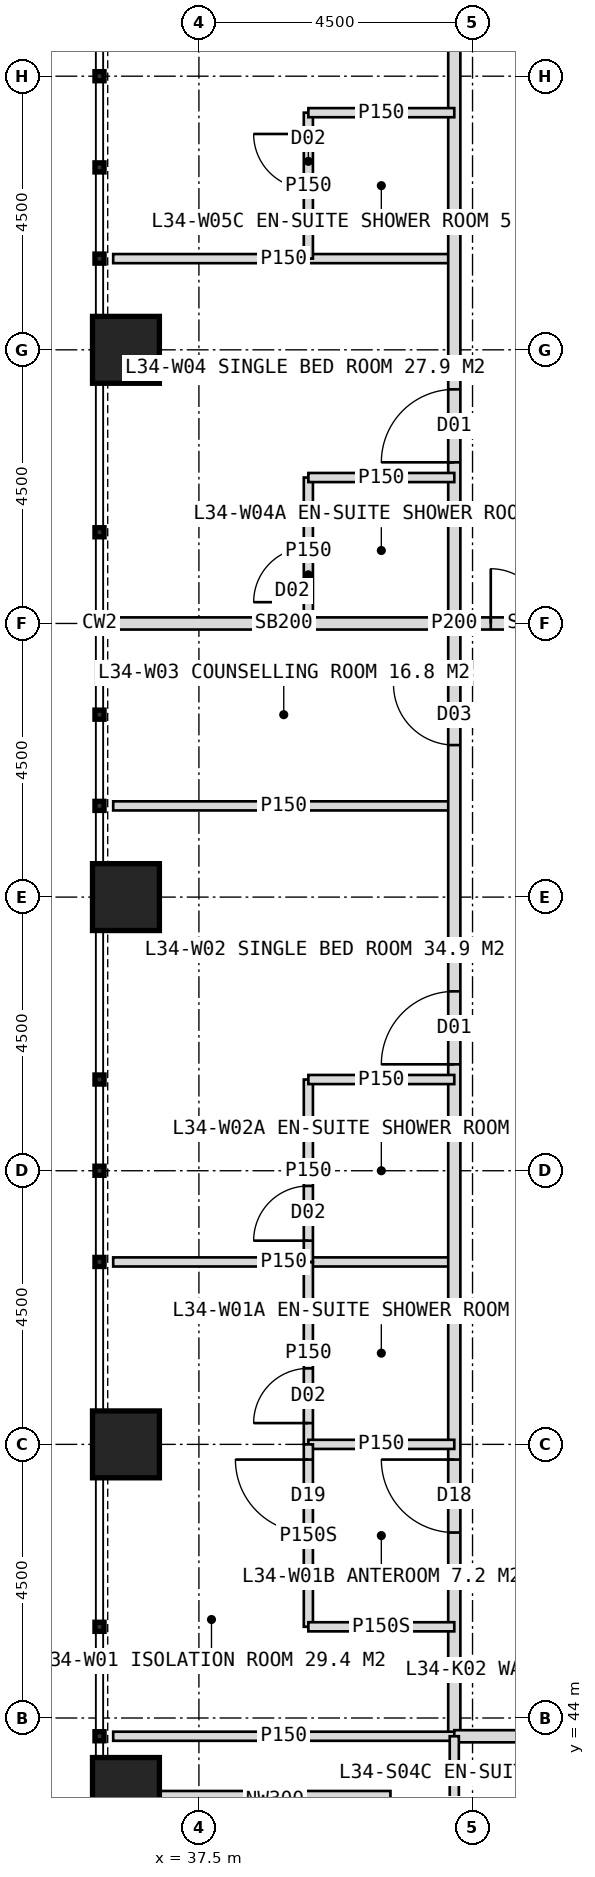
"""IFC4 building model, lengths in metres.
Left out: names, types, materials, properties, quantities, classifications, styles, units other than length and angle.
Written with IfcOpenShell. Run it as: python <this file> out.ifc"""

import sys

from ifc_helpers import new_model, si_unit, direction, frame, frame_2d, origin, origin_2d, place, context, subcontext, project, spatial, rectangle, hollow_rectangle, extrude, element, fill, save


model = new_model("IFC4")
c1 = context("Model", 3, precision=1e-05, world=origin(), true_north=direction((0.0, 1.0)))
c2 = subcontext(c1, "Body", "Model", "MODEL_VIEW")
j1 = project(units=[si_unit("LENGTHUNIT", "METRE"), si_unit("PLANEANGLEUNIT", "RADIAN")], contexts=[c1])
p1 = place(None, origin())
s1 = spatial("IfcSite", under=j1, at=p1, CompositionType="ELEMENT")
p2 = place(p1, origin())
s2 = spatial("IfcBuilding", under=s1, at=p2, CompositionType="ELEMENT")
p3 = place(p2, frame((0.0, 0.0, 144.0)))
s3 = spatial("IfcBuildingStorey", under=s2, at=p3, CompositionType="ELEMENT", Elevation=144.0)
for number, where, z_axis, x_axis in (
    (1, (36.3, 42.8, 0.0), (0.0, 0.0, 1.0), (1.0, 0.0, 0.0)),
    (2, (36.3, 48.5, 0.0), (0.0, 0.0, 1.0), (1.0, 0.0, 0.0)),
    (3, (36.3, 57.5, 0.0), (0.0, 0.0, 1.0), (1.0, 0.0, 0.0)),
    (4, (36.3, 66.5, 0.0), (0.0, 0.0, 1.0), (1.0, 0.0, 0.0)),
):
    element("IfcColumn", number, at=place(p3, frame(where, z_axis=z_axis, x_axis=x_axis)), inside=s3, PredefinedType="COLUMN", context=c2, shape_type="SweptSolid", body=[
        extrude(hollow_rectangle(XDim=1.1, YDim=1.1, WallThickness=0.1, at=origin_2d()), origin(), (0.0, 0.0, 1.0), 4.0),
    ])
p4 = place(p3, frame((40.65, 42.65, 0.0), z_axis=(0.0, 0.0, 1.0), x_axis=(-1.0, 0.0, 0.0)))
e5 = element("IfcWall", 5, at=p4, inside=s3, PredefinedType="ELEMENTEDWALL", context=c2, shape_type="SweptSolid", body=[
    extrude(rectangle(XDim=3.8, YDim=0.3, at=frame_2d((1.9, 0.0))), origin(), (0.0, 0.0, 1.0), 4.0),
])
for number, where, z_axis, x_axis in (
    (6, (41.7, 51.5, 0.0), (0.0, 0.0, 1.0), (-1.0, 0.0, 0.0)),
    (7, (41.7, 59.0, 0.0), (0.0, 0.0, 1.0), (-1.0, 0.0, 0.0)),
):
    element("IfcWall", number, at=place(p3, frame(where, z_axis=z_axis, x_axis=x_axis)), inside=s3, PredefinedType="PARTITIONING", context=c2, shape_type="SweptSolid", body=[
        extrude(rectangle(XDim=5.61, YDim=0.15, at=frame_2d((2.805, 0.0))), origin(), (0.0, 0.0, 1.0), 3.75),
    ])
p5 = place(p3, frame((41.7, 62.0, 0.0), z_axis=(0.0, 0.0, 1.0), x_axis=(-1.0, 0.0, 0.0)))
e8 = element("IfcWall", 8, at=p5, inside=s3, PredefinedType="SOLIDWALL", context=c2, shape_type="SweptSolid", body=[
    extrude(rectangle(XDim=5.61, YDim=0.2, at=frame_2d((2.805, 0.0))), origin(), (0.0, 0.0, 1.0), 2.95),
])
p6 = place(p3, frame((41.7, 68.0, 0.0), z_axis=(0.0, 0.0, 1.0), x_axis=(-1.0, 0.0, 0.0)))
e9 = element("IfcWall", 9, at=p6, inside=s3, PredefinedType="PARTITIONING", context=c2, shape_type="SweptSolid", body=[
    extrude(rectangle(XDim=5.61, YDim=0.15, at=frame_2d((2.805, 0.0))), origin(), (0.0, 0.0, 1.0), 3.75),
])
p7 = place(p3, frame((41.7, 43.7, 0.0), z_axis=(0.0, 0.0, 1.0), x_axis=(0.0, 1.0, 0.0)))
e10 = element("IfcWall", 10, at=p7, inside=s3, PredefinedType="PARTITIONING", context=c2, shape_type="SweptSolid", body=[
    extrude(rectangle(XDim=36.6, YDim=0.2, at=frame_2d((18.3, 0.0))), origin(), (0.0, 0.0, 1.0), 3.75),
])
p8 = place(p7, frame((3.35, 0.0, 0.0)))
e11 = element("IfcOpeningElement", 11, at=p8, cuts=e10, PredefinedType="OPENING", context=c2, shape_type="SweptSolid", body=[
    extrude(rectangle(XDim=1.2, YDim=2.2, at=frame_2d((0.6, 1.1))), frame((0.0, 0.11, 0.0), z_axis=(0.0, -1.0, 0.0), x_axis=(1.0, 0.0, 0.0)), (0.0, 0.0, 1.0), 0.22),
])
p9 = place(p7, frame((11.05, 0.0, 0.0)))
e12 = element("IfcOpeningElement", 12, at=p9, cuts=e10, PredefinedType="OPENING", context=c2, shape_type="SweptSolid", body=[
    extrude(rectangle(XDim=1.2, YDim=2.2, at=frame_2d((0.6, 1.1))), frame((0.0, 0.11, 0.0), z_axis=(0.0, -1.0, 0.0), x_axis=(1.0, 0.0, 0.0)), (0.0, 0.0, 1.0), 0.22),
])
p10 = place(p7, frame((16.3, 0.0, 0.0)))
e13 = element("IfcOpeningElement", 13, at=p10, cuts=e10, PredefinedType="OPENING", context=c2, shape_type="SweptSolid", body=[
    extrude(rectangle(XDim=1.0, YDim=2.1, at=frame_2d((0.5, 1.05))), frame((0.0, 0.11, 0.0), z_axis=(0.0, -1.0, 0.0), x_axis=(1.0, 0.0, 0.0)), (0.0, 0.0, 1.0), 0.22),
])
p11 = place(p7, frame((20.95, 0.0, 0.0)))
e14 = element("IfcOpeningElement", 14, at=p11, cuts=e10, PredefinedType="OPENING", context=c2, shape_type="SweptSolid", body=[
    extrude(rectangle(XDim=1.2, YDim=2.2, at=frame_2d((0.6, 1.1))), frame((0.0, 0.11, 0.0), z_axis=(0.0, -1.0, 0.0), x_axis=(1.0, 0.0, 0.0)), (0.0, 0.0, 1.0), 0.22),
])
p12 = place(p7, frame((32.75, 0.0, 0.0)))
e15 = element("IfcOpeningElement", 15, at=p12, cuts=e10, PredefinedType="OPENING", context=c2, shape_type="SweptSolid", body=[
    extrude(rectangle(XDim=1.2, YDim=2.2, at=frame_2d((0.6, 1.1))), frame((0.0, 0.11, 0.0), z_axis=(0.0, -1.0, 0.0), x_axis=(1.0, 0.0, 0.0)), (0.0, 0.0, 1.0), 0.22),
])
p13 = place(p3, frame((41.7, 43.7, 0.0), z_axis=(0.0, 0.0, 1.0), x_axis=(-1.0, 0.0, 0.0)))
e16 = element("IfcWall", 16, at=p13, inside=s3, PredefinedType="PARTITIONING", context=c2, shape_type="SweptSolid", body=[
    extrude(rectangle(XDim=5.61, YDim=0.15, at=frame_2d((2.805, 0.0))), origin(), (0.0, 0.0, 1.0), 3.75),
])
p14 = place(p3, frame((39.3, 48.5, 0.0), z_axis=(0.0, 0.0, 1.0), x_axis=(0.0, 1.0, 0.0)))
e17 = element("IfcWall", 17, at=p14, inside=s3, PredefinedType="PARTITIONING", context=c2, shape_type="SweptSolid", body=[
    extrude(rectangle(XDim=3.0, YDim=0.15, at=frame_2d((1.5, 0.0))), origin(), (0.0, 0.0, 1.0), 3.75),
])
p15 = place(p14, frame((0.35, 0.0, 0.0)))
e18 = element("IfcOpeningElement", 18, at=p15, cuts=e17, PredefinedType="OPENING", context=c2, shape_type="SweptSolid", body=[
    extrude(rectangle(XDim=0.9, YDim=2.1, at=frame_2d((0.45, 1.05))), frame((0.0, 0.085, 0.0), z_axis=(0.0, -1.0, 0.0), x_axis=(1.0, 0.0, 0.0)), (0.0, 0.0, 1.0), 0.17),
])
p16 = place(p3, frame((41.7, 48.5, 0.0), z_axis=(0.0, 0.0, 1.0), x_axis=(-1.0, 0.0, 0.0)))
e19 = element("IfcWall", 19, at=p16, inside=s3, PredefinedType="PARTITIONING", context=c2, shape_type="SweptSolid", body=[
    extrude(rectangle(XDim=2.4, YDim=0.15, at=frame_2d((1.2, 0.0))), origin(), (0.0, 0.0, 1.0), 2.95),
])
p17 = place(p3, frame((39.3, 45.5, 0.0), z_axis=(0.0, 0.0, 1.0), x_axis=(0.0, 1.0, 0.0)))
e20 = element("IfcWall", 20, at=p17, inside=s3, PredefinedType="PARTITIONING", context=c2, shape_type="SweptSolid", body=[
    extrude(rectangle(XDim=3.0, YDim=0.15, at=frame_2d((1.5, 0.0))), origin(), (0.0, 0.0, 1.0), 3.75),
])
p18 = place(p17, frame((1.55, 0.0, 0.0)))
e21 = element("IfcOpeningElement", 21, at=p18, cuts=e20, PredefinedType="OPENING", context=c2, shape_type="SweptSolid", body=[
    extrude(rectangle(XDim=1.2, YDim=2.2, at=frame_2d((0.6, 1.1))), frame((0.0, 0.085, 0.0), z_axis=(0.0, -1.0, 0.0), x_axis=(1.0, 0.0, 0.0)), (0.0, 0.0, 1.0), 0.17),
])
p19 = place(p3, frame((41.7, 45.5, 0.0), z_axis=(0.0, 0.0, 1.0), x_axis=(-1.0, 0.0, 0.0)))
e22 = element("IfcWall", 22, at=p19, inside=s3, PredefinedType="PARTITIONING", context=c2, shape_type="SweptSolid", body=[
    extrude(rectangle(XDim=2.4, YDim=0.15, at=frame_2d((1.2, 0.0))), origin(), (0.0, 0.0, 1.0), 3.75),
])
p20 = place(p3, frame((39.3, 51.5, 0.0), z_axis=(0.0, 0.0, 1.0), x_axis=(0.0, 1.0, 0.0)))
e23 = element("IfcWall", 23, at=p20, inside=s3, PredefinedType="PARTITIONING", context=c2, shape_type="SweptSolid", body=[
    extrude(rectangle(XDim=3.0, YDim=0.15, at=frame_2d((1.5, 0.0))), origin(), (0.0, 0.0, 1.0), 3.75),
])
p21 = place(p20, frame((0.35, 0.0, 0.0)))
e24 = element("IfcOpeningElement", 24, at=p21, cuts=e23, PredefinedType="OPENING", context=c2, shape_type="SweptSolid", body=[
    extrude(rectangle(XDim=0.9, YDim=2.1, at=frame_2d((0.45, 1.05))), frame((0.0, 0.085, 0.0), z_axis=(0.0, -1.0, 0.0), x_axis=(1.0, 0.0, 0.0)), (0.0, 0.0, 1.0), 0.17),
])
p22 = place(p3, frame((41.7, 54.5, 0.0), z_axis=(0.0, 0.0, 1.0), x_axis=(-1.0, 0.0, 0.0)))
e25 = element("IfcWall", 25, at=p22, inside=s3, PredefinedType="PARTITIONING", context=c2, shape_type="SweptSolid", body=[
    extrude(rectangle(XDim=2.4, YDim=0.15, at=frame_2d((1.2, 0.0))), origin(), (0.0, 0.0, 1.0), 3.75),
])
p23 = place(p3, frame((39.3, 62.0, 0.0), z_axis=(0.0, 0.0, 1.0), x_axis=(0.0, 1.0, 0.0)))
e26 = element("IfcWall", 26, at=p23, inside=s3, PredefinedType="PARTITIONING", context=c2, shape_type="SweptSolid", body=[
    extrude(rectangle(XDim=2.4, YDim=0.15, at=frame_2d((1.2, 0.0))), origin(), (0.0, 0.0, 1.0), 3.75),
])
p24 = place(p23, frame((0.35, 0.0, 0.0)))
e27 = element("IfcOpeningElement", 27, at=p24, cuts=e26, PredefinedType="OPENING", context=c2, shape_type="SweptSolid", body=[
    extrude(rectangle(XDim=0.9, YDim=2.1, at=frame_2d((0.45, 1.05))), frame((0.0, 0.085, 0.0), z_axis=(0.0, -1.0, 0.0), x_axis=(1.0, 0.0, 0.0)), (0.0, 0.0, 1.0), 0.17),
])
p25 = place(p3, frame((41.7, 64.4, 0.0), z_axis=(0.0, 0.0, 1.0), x_axis=(-1.0, 0.0, 0.0)))
e28 = element("IfcWall", 28, at=p25, inside=s3, PredefinedType="PARTITIONING", context=c2, shape_type="SweptSolid", body=[
    extrude(rectangle(XDim=2.4, YDim=0.15, at=frame_2d((1.2, 0.0))), origin(), (0.0, 0.0, 1.0), 3.75),
])
p26 = place(p3, frame((39.3, 68.0, 0.0), z_axis=(0.0, 0.0, 1.0), x_axis=(0.0, 1.0, 0.0)))
e29 = element("IfcWall", 29, at=p26, inside=s3, PredefinedType="PARTITIONING", context=c2, shape_type="SweptSolid", body=[
    extrude(rectangle(XDim=2.4, YDim=0.15, at=frame_2d((1.2, 0.0))), origin(), (0.0, 0.0, 1.0), 3.75),
])
p27 = place(p26, frame((1.15, 0.0, 0.0)))
e30 = element("IfcOpeningElement", 30, at=p27, cuts=e29, PredefinedType="OPENING", context=c2, shape_type="SweptSolid", body=[
    extrude(rectangle(XDim=0.9, YDim=2.1, at=frame_2d((0.45, 1.05))), frame((0.0, 0.085, 0.0), z_axis=(0.0, -1.0, 0.0), x_axis=(1.0, 0.0, 0.0)), (0.0, 0.0, 1.0), 0.17),
])
p28 = place(p3, frame((41.7, 70.4, 0.0), z_axis=(0.0, 0.0, 1.0), x_axis=(-1.0, 0.0, 0.0)))
e31 = element("IfcWall", 31, at=p28, inside=s3, PredefinedType="PARTITIONING", context=c2, shape_type="SweptSolid", body=[
    extrude(rectangle(XDim=2.4, YDim=0.15, at=frame_2d((1.2, 0.0))), origin(), (0.0, 0.0, 1.0), 3.75),
])
p29 = place(p3, frame((78.3, 43.7, 0.0), z_axis=(0.0, 0.0, 1.0), x_axis=(-1.0, 0.0, 0.0)))
e32 = element("IfcWall", 32, at=p29, inside=s3, PredefinedType="PARTITIONING", context=c2, shape_type="SweptSolid", body=[
    extrude(rectangle(XDim=36.6, YDim=0.2, at=frame_2d((18.3, 0.0))), origin(), (0.0, 0.0, 1.0), 3.75),
])
p30 = place(p29, frame((3.35, 0.0, 0.0)))
e33 = element("IfcOpeningElement", 33, at=p30, cuts=e32, PredefinedType="OPENING", context=c2, shape_type="SweptSolid", body=[
    extrude(rectangle(XDim=1.2, YDim=2.2, at=frame_2d((0.6, 1.1))), frame((0.0, 0.11, 0.0), z_axis=(0.0, -1.0, 0.0), x_axis=(1.0, 0.0, 0.0)), (0.0, 0.0, 1.0), 0.22),
])
p31 = place(p29, frame((11.05, 0.0, 0.0)))
e34 = element("IfcOpeningElement", 34, at=p31, cuts=e32, PredefinedType="OPENING", context=c2, shape_type="SweptSolid", body=[
    extrude(rectangle(XDim=1.2, YDim=2.2, at=frame_2d((0.6, 1.1))), frame((0.0, 0.11, 0.0), z_axis=(0.0, -1.0, 0.0), x_axis=(1.0, 0.0, 0.0)), (0.0, 0.0, 1.0), 0.22),
])
p32 = place(p29, frame((19.85, 0.0, 0.0)))
e35 = element("IfcOpeningElement", 35, at=p32, cuts=e32, PredefinedType="OPENING", context=c2, shape_type="SweptSolid", body=[
    extrude(rectangle(XDim=1.2, YDim=2.2, at=frame_2d((0.6, 1.1))), frame((0.0, 0.11, 0.0), z_axis=(0.0, -1.0, 0.0), x_axis=(1.0, 0.0, 0.0)), (0.0, 0.0, 1.0), 0.22),
])
p33 = place(p29, frame((26.95, 0.0, 0.0)))
e36 = element("IfcOpeningElement", 36, at=p33, cuts=e32, PredefinedType="OPENING", context=c2, shape_type="SweptSolid", body=[
    extrude(rectangle(XDim=1.2, YDim=2.2, at=frame_2d((0.6, 1.1))), frame((0.0, 0.11, 0.0), z_axis=(0.0, -1.0, 0.0), x_axis=(1.0, 0.0, 0.0)), (0.0, 0.0, 1.0), 0.22),
])
p34 = place(p3, frame((41.7, 43.7, 0.0), z_axis=(0.0, 0.0, 1.0), x_axis=(0.0, -1.0, 0.0)))
e37 = element("IfcWall", 37, at=p34, inside=s3, PredefinedType="PARTITIONING", context=c2, shape_type="SweptSolid", body=[
    extrude(rectangle(XDim=2.4, YDim=0.15, at=frame_2d((1.2, 0.0))), origin(), (0.0, 0.0, 1.0), 3.75),
])
p35 = place(p3, frame((44.4, 62.0, 0.0), z_axis=(0.0, 0.0, 1.0), x_axis=(-1.0, 0.0, 0.0)))
e38 = element("IfcWall", 38, at=p35, inside=s3, PredefinedType="SOLIDWALL", context=c2, shape_type="SweptSolid", body=[
    extrude(rectangle(XDim=2.7, YDim=0.2, at=frame_2d((1.35, 0.0))), origin(), (0.0, 0.0, 1.0), 2.95),
])
p36 = place(p35, frame((0.3, 0.0, 0.0)))
e39 = element("IfcOpeningElement", 39, at=p36, cuts=e38, PredefinedType="OPENING", context=c2, shape_type="SweptSolid", body=[
    extrude(rectangle(XDim=1.8, YDim=2.2, at=frame_2d((0.9, 1.1))), frame((0.0, 0.11, 0.0), z_axis=(0.0, -1.0, 0.0), x_axis=(1.0, 0.0, 0.0)), (0.0, 0.0, 1.0), 0.22),
])
p37 = place(p18, origin())
e40 = element("IfcDoor", 40, at=p37, inside=s3, OperationType="SINGLE_SWING_RIGHT", PredefinedType="DOOR", context=c2, shape_type="SweptSolid", body=[
    extrude(rectangle(XDim=1.2, YDim=2.2, at=frame_2d((0.6, 1.1))), frame((0.0, 0.025, 0.0), z_axis=(0.0, -1.0, 0.0), x_axis=(1.0, 0.0, 0.0)), (0.0, 0.0, 1.0), 0.05),
])
fill(e21, e40)
p38 = place(p8, origin())
e41 = element("IfcDoor", 41, at=p38, inside=s3, OperationType="SINGLE_SWING_RIGHT", PredefinedType="DOOR", context=c2, shape_type="SweptSolid", body=[
    extrude(rectangle(XDim=1.2, YDim=2.2, at=frame_2d((0.6, 1.1))), frame((0.0, 0.025, 0.0), z_axis=(0.0, -1.0, 0.0), x_axis=(1.0, 0.0, 0.0)), (0.0, 0.0, 1.0), 0.05),
])
fill(e11, e41)
p39 = place(p15, origin())
e42 = element("IfcDoor", 42, at=p39, inside=s3, OperationType="SINGLE_SWING_LEFT", PredefinedType="DOOR", context=c2, shape_type="SweptSolid", body=[
    extrude(rectangle(XDim=0.9, YDim=2.1, at=frame_2d((0.45, 1.05))), frame((0.0, 0.025, 0.0), z_axis=(0.0, -1.0, 0.0), x_axis=(1.0, 0.0, 0.0)), (0.0, 0.0, 1.0), 0.05),
])
fill(e18, e42)
p40 = place(p9, origin())
e43 = element("IfcDoor", 43, at=p40, inside=s3, OperationType="SINGLE_SWING_LEFT", PredefinedType="DOOR", context=c2, shape_type="SweptSolid", body=[
    extrude(rectangle(XDim=1.2, YDim=2.2, at=frame_2d((0.6, 1.1))), frame((0.0, 0.025, 0.0), z_axis=(0.0, -1.0, 0.0), x_axis=(1.0, 0.0, 0.0)), (0.0, 0.0, 1.0), 0.05),
])
fill(e12, e43)
p41 = place(p21, origin())
e44 = element("IfcDoor", 44, at=p41, inside=s3, OperationType="SINGLE_SWING_LEFT", PredefinedType="DOOR", context=c2, shape_type="SweptSolid", body=[
    extrude(rectangle(XDim=0.9, YDim=2.1, at=frame_2d((0.45, 1.05))), frame((0.0, 0.025, 0.0), z_axis=(0.0, -1.0, 0.0), x_axis=(1.0, 0.0, 0.0)), (0.0, 0.0, 1.0), 0.05),
])
fill(e24, e44)
p42 = place(p10, origin())
e45 = element("IfcDoor", 45, at=p42, inside=s3, OperationType="SINGLE_SWING_RIGHT", PredefinedType="DOOR", context=c2, shape_type="SweptSolid", body=[
    extrude(rectangle(XDim=1.0, YDim=2.1, at=frame_2d((0.5, 1.05))), frame((0.0, 0.025, 0.0), z_axis=(0.0, -1.0, 0.0), x_axis=(1.0, 0.0, 0.0)), (0.0, 0.0, 1.0), 0.05),
])
fill(e13, e45)
p43 = place(p11, origin())
e46 = element("IfcDoor", 46, at=p43, inside=s3, OperationType="SINGLE_SWING_LEFT", PredefinedType="DOOR", context=c2, shape_type="SweptSolid", body=[
    extrude(rectangle(XDim=1.2, YDim=2.2, at=frame_2d((0.6, 1.1))), frame((0.0, 0.025, 0.0), z_axis=(0.0, -1.0, 0.0), x_axis=(1.0, 0.0, 0.0)), (0.0, 0.0, 1.0), 0.05),
])
fill(e14, e46)
p44 = place(p24, origin())
e47 = element("IfcDoor", 47, at=p44, inside=s3, OperationType="SINGLE_SWING_LEFT", PredefinedType="DOOR", context=c2, shape_type="SweptSolid", body=[
    extrude(rectangle(XDim=0.9, YDim=2.1, at=frame_2d((0.45, 1.05))), frame((0.0, 0.025, 0.0), z_axis=(0.0, -1.0, 0.0), x_axis=(1.0, 0.0, 0.0)), (0.0, 0.0, 1.0), 0.05),
])
fill(e27, e47)
p45 = place(p27, origin())
e48 = element("IfcDoor", 48, at=p45, inside=s3, OperationType="SINGLE_SWING_RIGHT", PredefinedType="DOOR", context=c2, shape_type="SweptSolid", body=[
    extrude(rectangle(XDim=0.9, YDim=2.1, at=frame_2d((0.45, 1.05))), frame((0.0, 0.025, 0.0), z_axis=(0.0, -1.0, 0.0), x_axis=(1.0, 0.0, 0.0)), (0.0, 0.0, 1.0), 0.05),
])
fill(e30, e48)
p46 = place(p36, origin())
e49 = element("IfcDoor", 49, at=p46, inside=s3, OperationType="DOUBLE_DOOR_DOUBLE_SWING", PredefinedType="DOOR", context=c2, shape_type="SweptSolid", body=[
    extrude(rectangle(XDim=1.8, YDim=2.2, at=frame_2d((0.9, 1.1))), frame((0.0, 0.025, 0.0), z_axis=(0.0, -1.0, 0.0), x_axis=(1.0, 0.0, 0.0)), (0.0, 0.0, 1.0), 0.05),
])
fill(e39, e49)
save(model, sys.argv[1])
